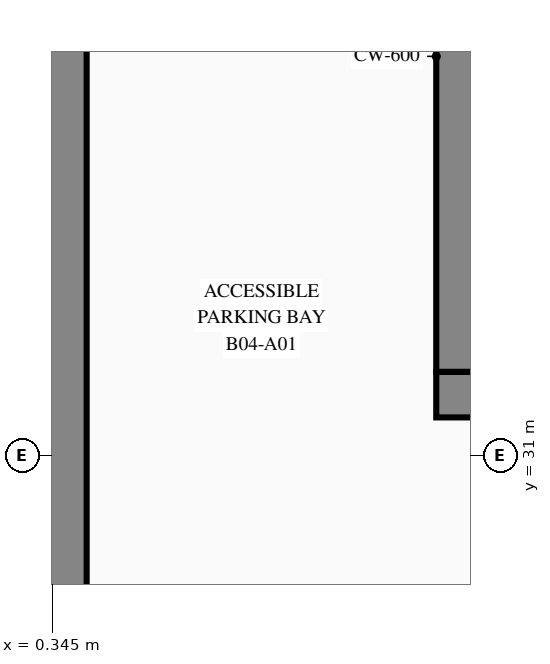
"""IFC4 building model, lengths in metres.
Left out: names, types, materials, properties, quantities, classifications, styles, units other than length and angle.
Written with IfcOpenShell. Run it as: python <this file> out.ifc"""

import sys

from ifc_helpers import new_model, si_unit, direction, frame, frame_2d, origin, place, context, subcontext, project, spatial, rectangle, extrude, element, save


model = new_model("IFC4")
c1 = context("Model", 3, precision=1e-05, world=origin(), true_north=direction((0.0, 1.0)))
c2 = subcontext(c1, "Body", "Model", "MODEL_VIEW")
j1 = project(units=[si_unit("LENGTHUNIT", "METRE"), si_unit("PLANEANGLEUNIT", "RADIAN")], contexts=[c1])
p1 = place(None, origin())
s1 = spatial("IfcSite", under=j1, at=p1, CompositionType="ELEMENT")
p2 = place(p1, origin())
s2 = spatial("IfcBuilding", under=s1, at=p2, CompositionType="ELEMENT")
p3 = place(p2, frame((0.0, 0.0, -18.0)))
s3 = spatial("IfcBuildingStorey", under=s2, at=p3, CompositionType="ELEMENT", Elevation=-18.0)
p4 = place(p3, frame((0.4, 0.8, 0.0), z_axis=(0.0, 0.0, 1.0), x_axis=(0.0, 1.0, 0.0)))
e1 = element("IfcWall", 1, at=p4, inside=s3, PredefinedType="USERDEFINED", context=c2, shape_type="SweptSolid", body=[
    extrude(rectangle(XDim=44.4, YDim=0.8, at=frame_2d((22.2, 0.0))), origin(), (0.0, 0.0, 1.0), 4.5),
])
p5 = place(p3, frame((5.4, 31.8, 0.0), z_axis=(0.0, 0.0, 1.0), x_axis=(1.0, 0.0, 0.0)))
e2 = element("IfcWall", 2, at=p5, inside=s3, PredefinedType="SHEAR", context=c2, shape_type="SweptSolid", body=[
    extrude(rectangle(XDim=18.05, YDim=0.6, at=frame_2d((9.025, 0.0))), origin(), (0.0, 0.0, 1.0), 4.5),
])
p6 = place(p5, frame((3.25, 0.0, 0.0)))
e3 = element("IfcOpeningElement", 3, at=p6, cuts=e2, PredefinedType="OPENING", context=c2, shape_type="SweptSolid", body=[
    extrude(rectangle(XDim=1.2, YDim=2.2, at=frame_2d((0.6, 1.1))), frame((0.0, 0.31, 0.0), z_axis=(0.0, -1.0, 0.0), x_axis=(1.0, 0.0, 0.0)), (0.0, 0.0, 1.0), 0.62),
])
p7 = place(p5, frame((7.1, 0.0, 0.0)))
e4 = element("IfcOpeningElement", 4, at=p7, cuts=e2, PredefinedType="OPENING", context=c2, shape_type="SweptSolid", body=[
    extrude(rectangle(XDim=1.2, YDim=2.2, at=frame_2d((0.6, 1.1))), frame((0.0, 0.31, 0.0), z_axis=(0.0, -1.0, 0.0), x_axis=(1.0, 0.0, 0.0)), (0.0, 0.0, 1.0), 0.62),
])
p8 = place(p5, frame((8.95, 0.0, 0.0)))
e5 = element("IfcOpeningElement", 5, at=p8, cuts=e2, PredefinedType="OPENING", context=c2, shape_type="SweptSolid", body=[
    extrude(rectangle(XDim=1.15, YDim=2.2, at=frame_2d((0.575, 1.1))), frame((0.0, 0.31, 0.0), z_axis=(0.0, -1.0, 0.0), x_axis=(1.0, 0.0, 0.0)), (0.0, 0.0, 1.0), 0.62),
])
p9 = place(p5, frame((16.05, 0.0, 0.0)))
e6 = element("IfcOpeningElement", 6, at=p9, cuts=e2, PredefinedType="OPENING", context=c2, shape_type="SweptSolid", body=[
    extrude(rectangle(XDim=1.2, YDim=2.2, at=frame_2d((0.6, 1.1))), frame((0.0, 0.31, 0.0), z_axis=(0.0, -1.0, 0.0), x_axis=(1.0, 0.0, 0.0)), (0.0, 0.0, 1.0), 0.62),
])
p10 = place(p3, frame((5.7, 32.1, 0.0), z_axis=(0.0, 0.0, 1.0), x_axis=(0.0, 1.0, 0.0)))
e7 = element("IfcWall", 7, at=p10, inside=s3, PredefinedType="SHEAR", context=c2, shape_type="SweptSolid", body=[
    extrude(rectangle(XDim=8.3, YDim=0.6, at=frame_2d((4.15, 0.0))), origin(), (0.0, 0.0, 1.0), 4.5),
])
save(model, sys.argv[1])
